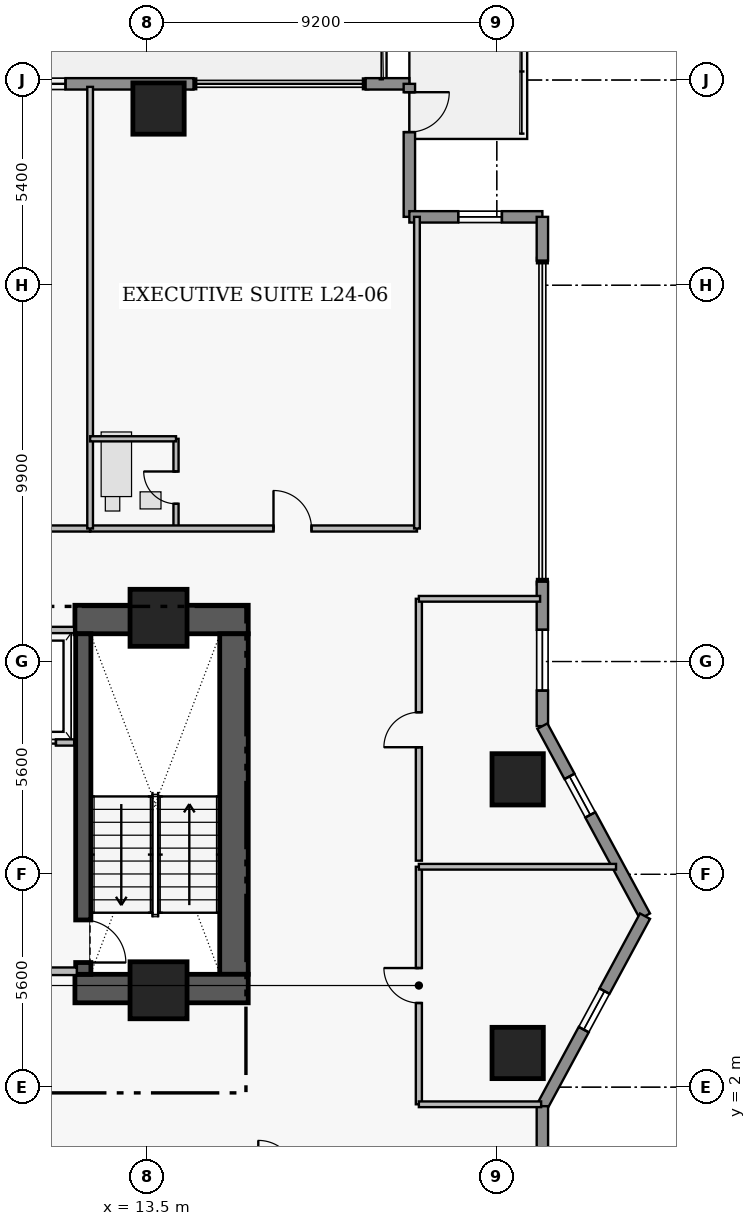
"""IFC4 building model, lengths in metres.
Left out: names, types, materials, properties, quantities, classifications, styles, units other than length and angle.
Written with IfcOpenShell. Run it as: python <this file> out.ifc"""

import sys

from ifc_helpers import new_model, si_unit, direction, frame, frame_2d, origin, origin_2d, place, context, subcontext, project, spatial, rectangle, extrude, element, fill, save


model = new_model("IFC4")
c1 = context("Model", 3, precision=1e-05, world=origin(), true_north=direction((0.0, 1.0)))
c2 = subcontext(c1, "Body", "Model", "MODEL_VIEW")
j1 = project(units=[si_unit("LENGTHUNIT", "METRE"), si_unit("PLANEANGLEUNIT", "RADIAN")], contexts=[c1])
p1 = place(None, origin())
s1 = spatial("IfcSite", under=j1, at=p1, CompositionType="ELEMENT")
p2 = place(p1, origin())
s2 = spatial("IfcBuilding", under=s1, at=p2, CompositionType="ELEMENT")
p3 = place(p2, frame((0.0, 0.0, 99.3)))
s3 = spatial("IfcBuildingStorey", under=s2, at=p3, CompositionType="ELEMENT", Elevation=99.3)
p4 = place(p3, frame((11.6, 14.305, 0.0), z_axis=(0.0, 0.0, 1.0), x_axis=(1.0, 0.0, 0.0)))
e1 = element("IfcWall", 1, at=p4, inside=s3, PredefinedType="SHEAR", context=c2, shape_type="SweptSolid", body=[
    extrude(rectangle(XDim=4.56, YDim=0.75, at=frame_2d((2.28, 0.0))), origin(), (0.0, 0.0, 1.0), 3.46),
])
p5 = place(p3, frame((15.785, 4.97, 0.0), z_axis=(0.0, 0.0, 1.0), x_axis=(0.0, 1.0, 0.0)))
e2 = element("IfcWall", 2, at=p5, inside=s3, PredefinedType="SHEAR", context=c2, shape_type="SweptSolid", body=[
    extrude(rectangle(XDim=8.96, YDim=0.75, at=frame_2d((4.48, 0.0))), origin(), (0.0, 0.0, 1.0), 3.46),
])
p6 = place(p3, frame((11.6, 4.595, 0.0), z_axis=(0.0, 0.0, 1.0), x_axis=(1.0, 0.0, 0.0)))
e3 = element("IfcWall", 3, at=p6, inside=s3, PredefinedType="SHEAR", context=c2, shape_type="SweptSolid", body=[
    extrude(rectangle(XDim=4.56, YDim=0.75, at=frame_2d((2.28, 0.0))), origin(), (0.0, 0.0, 1.0), 3.46),
])
p7 = place(p3, frame((11.82, 13.93, 0.0), z_axis=(0.0, 0.0, 1.0), x_axis=(0.0, -1.0, 0.0)))
e4 = element("IfcWall", 4, at=p7, inside=s3, PredefinedType="SHEAR", context=c2, shape_type="SweptSolid", body=[
    extrude(rectangle(XDim=8.96, YDim=0.4, at=frame_2d((4.48, 0.0))), origin(), (0.0, 0.0, 1.0), 3.46),
])
p8 = place(p7, frame((7.53, 0.0, 0.0)))
e5 = element("IfcOpeningElement", 5, at=p8, cuts=e4, PredefinedType="OPENING", context=c2, shape_type="SweptSolid", body=[
    extrude(rectangle(XDim=1.12, YDim=2.22, at=frame_2d((0.56, 1.11))), frame((0.0, 0.21, 0.0), z_axis=(0.0, -1.0, 0.0), x_axis=(1.0, 0.0, 0.0)), (0.0, 0.0, 1.0), 0.42),
])
for number, where, z_axis, x_axis in (
    (6, (13.8, 14.35, 0.0), (0.0, 0.0, 1.0), (1.0, 0.0, 0.0)),
    (7, (13.8, 4.55, 0.0), (0.0, 0.0, 1.0), (1.0, 0.0, 0.0)),
):
    element("IfcColumn", number, at=place(p3, frame(where, z_axis=z_axis, x_axis=x_axis)), inside=s3, PredefinedType="COLUMN", context=c2, shape_type="SweptSolid", body=[
        extrude(rectangle(XDim=1.5, YDim=1.5, at=origin_2d()), origin(), (0.0, 0.0, 1.0), 3.65),
    ])
for number, where, z_axis, x_axis in (
    (8, (13.8, 27.75, 0.0), (0.0, 0.0, 1.0), (1.0, 0.0, 0.0)),
    (9, (23.25, 2.9, 0.0), (0.0, 0.0, 1.0), (1.0, 0.0, 0.0)),
    (10, (23.25, 10.1, 0.0), (0.0, 0.0, 1.0), (1.0, 0.0, 0.0)),
):
    element("IfcColumn", number, at=place(p3, frame(where, z_axis=z_axis, x_axis=x_axis)), inside=s3, PredefinedType="COLUMN", context=c2, shape_type="SweptSolid", body=[
        extrude(rectangle(XDim=1.35, YDim=1.35, at=origin_2d()), origin(), (0.0, 0.0, 1.0), 3.65),
    ])
p9 = place(p3, frame((3.68, 28.4, 0.0), z_axis=(0.0, 0.0, 1.0), x_axis=(1.0, 0.0, 0.0)))
e11 = element("IfcWall", 11, at=p9, inside=s3, PredefinedType="STANDARD", context=c2, shape_type="SweptSolid", body=[
    extrude(rectangle(XDim=11.04, YDim=0.3, at=frame_2d((5.52, 0.0))), origin(), (0.0, 0.0, 1.0), 3.43),
])
p10 = place(p9, frame((4.695, 0.0, 0.0)))
e12 = element("IfcOpeningElement", 12, at=p10, cuts=e11, PredefinedType="OPENING", context=c2, shape_type="SweptSolid", body=[
    extrude(rectangle(XDim=1.05, YDim=2.2, at=frame_2d((0.525, 1.1))), frame((0.0, 0.16, 0.0), z_axis=(0.0, -1.0, 0.0), x_axis=(1.0, 0.0, 0.0)), (0.0, 0.0, 1.0), 0.32),
])
p11 = place(p9, frame((2.768, 0.0, 0.95)))
e13 = element("IfcOpeningElement", 13, at=p11, cuts=e11, PredefinedType="OPENING", context=c2, shape_type="SweptSolid", body=[
    extrude(rectangle(XDim=1.15, YDim=1.55, at=frame_2d((0.575, 0.775))), frame((0.0, 0.16, 0.0), z_axis=(0.0, -1.0, 0.0), x_axis=(1.0, 0.0, 0.0)), (0.0, 0.0, 1.0), 0.32),
])
p12 = place(p9, frame((6.522, 0.0, 0.95)))
e14 = element("IfcOpeningElement", 14, at=p12, cuts=e11, PredefinedType="OPENING", context=c2, shape_type="SweptSolid", body=[
    extrude(rectangle(XDim=1.15, YDim=1.55, at=frame_2d((0.575, 0.775))), frame((0.0, 0.16, 0.0), z_axis=(0.0, -1.0, 0.0), x_axis=(1.0, 0.0, 0.0)), (0.0, 0.0, 1.0), 0.32),
])
p13 = place(p3, frame((19.25, 28.4, 0.0), z_axis=(0.0, 0.0, 1.0), x_axis=(1.0, 0.0, 0.0)))
e15 = element("IfcWall", 15, at=p13, inside=s3, PredefinedType="STANDARD", context=c2, shape_type="SweptSolid", body=[
    extrude(rectangle(XDim=1.15, YDim=0.3, at=frame_2d((0.575, 0.0))), origin(), (0.0, 0.0, 1.0), 3.43),
])
p14 = place(p3, frame((20.4, 28.4, 0.0), z_axis=(0.0, 0.0, 1.0), x_axis=(0.0, -1.0, 0.0)))
e16 = element("IfcWall", 16, at=p14, inside=s3, PredefinedType="STANDARD", context=c2, shape_type="SweptSolid", body=[
    extrude(rectangle(XDim=3.5, YDim=0.3, at=frame_2d((1.75, 0.0))), origin(), (0.0, 0.0, 1.0), 3.43),
])
p15 = place(p14, frame((0.22, 0.0, 0.0)))
e17 = element("IfcOpeningElement", 17, at=p15, cuts=e16, PredefinedType="OPENING", context=c2, shape_type="SweptSolid", body=[
    extrude(rectangle(XDim=1.05, YDim=2.2, at=frame_2d((0.525, 1.1))), frame((0.0, 0.16, 0.0), z_axis=(0.0, -1.0, 0.0), x_axis=(1.0, 0.0, 0.0)), (0.0, 0.0, 1.0), 0.32),
])
p16 = place(p3, frame((20.4, 24.9, 0.0), z_axis=(0.0, 0.0, 1.0), x_axis=(1.0, 0.0, 0.0)))
e18 = element("IfcWall", 18, at=p16, inside=s3, PredefinedType="STANDARD", context=c2, shape_type="SweptSolid", body=[
    extrude(rectangle(XDim=3.5, YDim=0.3, at=frame_2d((1.75, 0.0))), origin(), (0.0, 0.0, 1.0), 3.43),
])
p17 = place(p16, frame((1.285, 0.0, 1.25)))
e19 = element("IfcOpeningElement", 19, at=p17, cuts=e18, PredefinedType="OPENING", context=c2, shape_type="SweptSolid", body=[
    extrude(rectangle(XDim=1.15, YDim=1.55, at=frame_2d((0.575, 0.775))), frame((0.0, 0.16, 0.0), z_axis=(0.0, -1.0, 0.0), x_axis=(1.0, 0.0, 0.0)), (0.0, 0.0, 1.0), 0.32),
])
p18 = place(p3, frame((23.9, 24.9, 0.0), z_axis=(0.0, 0.0, 1.0), x_axis=(0.0, -1.0, 0.0)))
e20 = element("IfcWall", 20, at=p18, inside=s3, PredefinedType="STANDARD", context=c2, shape_type="SweptSolid", body=[
    extrude(rectangle(XDim=1.15, YDim=0.3, at=frame_2d((0.575, 0.0))), origin(), (0.0, 0.0, 1.0), 3.43),
])
p19 = place(p3, frame((23.9, 15.3, 0.0), z_axis=(0.0, 0.0, 1.0), x_axis=(0.0, -1.0, 0.0)))
e21 = element("IfcWall", 21, at=p19, inside=s3, PredefinedType="STANDARD", context=c2, shape_type="SweptSolid", body=[
    extrude(rectangle(XDim=3.8, YDim=0.3, at=frame_2d((1.9, 0.0))), origin(), (0.0, 0.0, 1.0), 3.43),
])
p20 = place(p19, frame((1.265, 0.0, 0.85)))
e22 = element("IfcOpeningElement", 22, at=p20, cuts=e21, PredefinedType="OPENING", context=c2, shape_type="SweptSolid", body=[
    extrude(rectangle(XDim=1.6, YDim=1.8, at=frame_2d((0.8, 0.9))), frame((0.0, 0.16, 0.0), z_axis=(0.0, -1.0, 0.0), x_axis=(1.0, 0.0, 0.0)), (0.0, 0.0, 1.0), 0.32),
])
p21 = place(p3, frame((23.9, 11.5, 0.0), z_axis=(0.0, 0.0, 1.0), x_axis=(0.475175525499, -0.879891027325, 0.0)))
e23 = element("IfcWall", 23, at=p21, inside=s3, PredefinedType="STANDARD", context=c2, shape_type="SweptSolid", body=[
    extrude(rectangle(XDim=5.683, YDim=0.3, at=frame_2d((2.841, 0.0))), origin(), (0.0, 0.0, 1.0), 3.43),
])
p22 = place(p21, frame((1.503, 0.0, 1.25)))
e24 = element("IfcOpeningElement", 24, at=p22, cuts=e23, PredefinedType="OPENING", context=c2, shape_type="SweptSolid", body=[
    extrude(rectangle(XDim=1.15, YDim=1.55, at=frame_2d((0.575, 0.775))), frame((0.0, 0.16, 0.0), z_axis=(0.0, -1.0, 0.0), x_axis=(1.0, 0.0, 0.0)), (0.0, 0.0, 1.0), 0.32),
])
p23 = place(p3, frame((26.6, 6.5, 0.0), z_axis=(0.0, 0.0, 1.0), x_axis=(-0.475175525499, -0.879891027325, 0.0)))
e25 = element("IfcWall", 25, at=p23, inside=s3, PredefinedType="STANDARD", context=c2, shape_type="SweptSolid", body=[
    extrude(rectangle(XDim=5.683, YDim=0.3, at=frame_2d((2.841, 0.0))), origin(), (0.0, 0.0, 1.0), 3.43),
])
p24 = place(p23, frame((2.242, 0.0, 1.25)))
e26 = element("IfcOpeningElement", 26, at=p24, cuts=e25, PredefinedType="OPENING", context=c2, shape_type="SweptSolid", body=[
    extrude(rectangle(XDim=1.15, YDim=1.55, at=frame_2d((0.575, 0.775))), frame((0.0, 0.16, 0.0), z_axis=(0.0, -1.0, 0.0), x_axis=(1.0, 0.0, 0.0)), (0.0, 0.0, 1.0), 0.32),
])
p25 = place(p3, frame((23.9, 1.5, 0.0), z_axis=(0.0, 0.0, 1.0), x_axis=(0.0, -1.0, 0.0)))
e27 = element("IfcWall", 27, at=p25, inside=s3, PredefinedType="STANDARD", context=c2, shape_type="SweptSolid", body=[
    extrude(rectangle(XDim=1.15, YDim=0.3, at=frame_2d((0.575, 0.0))), origin(), (0.0, 0.0, 1.0), 3.43),
])
p26 = place(p3, frame((9.42, 11.07, 0.0), z_axis=(0.0, 0.0, 1.0), x_axis=(1.0, 0.0, 0.0)))
e28 = element("IfcWall", 28, at=p26, inside=s3, PredefinedType="PARTITIONING", context=c2, shape_type="SweptSolid", body=[
    extrude(rectangle(XDim=2.16, YDim=0.165, at=frame_2d((1.08, 0.0))), origin(), (0.0, 0.0, 1.0), 3.43),
])
p27 = place(p26, frame((0.53, 0.0, 0.0)))
e29 = element("IfcOpeningElement", 29, at=p27, cuts=e28, PredefinedType="OPENING", context=c2, shape_type="SweptSolid", body=[
    extrude(rectangle(XDim=1.15, YDim=2.25, at=frame_2d((0.575, 1.125))), frame((0.0, 0.093, 0.0), z_axis=(0.0, -1.0, 0.0), x_axis=(1.0, 0.0, 0.0)), (0.0, 0.0, 1.0), 0.185),
])
p28 = place(p3, frame((5.8, 16.7, 0.0), z_axis=(0.0, 0.0, 1.0), x_axis=(1.0, 0.0, 0.0)))
e30 = element("IfcWall", 30, at=p28, inside=s3, PredefinedType="PARTITIONING", context=c2, shape_type="SweptSolid", body=[
    extrude(rectangle(XDim=6.2, YDim=0.16, at=frame_2d((3.1, 0.0))), origin(), (0.0, 0.0, 1.0), 2.973),
])
p29 = place(p28, frame((3.75, 0.0, 0.0)))
e31 = element("IfcOpeningElement", 31, at=p29, cuts=e30, PredefinedType="OPENING", context=c2, shape_type="SweptSolid", body=[
    extrude(rectangle(XDim=1.0, YDim=2.15, at=frame_2d((0.5, 1.075))), frame((0.0, 0.09, 0.0), z_axis=(0.0, -1.0, 0.0), x_axis=(1.0, 0.0, 0.0)), (0.0, 0.0, 1.0), 0.18),
])
p30 = place(p3, frame((14.26, 16.7, 0.0), z_axis=(0.0, 0.0, 1.0), x_axis=(0.0, 1.0, 0.0)))
e32 = element("IfcWall", 32, at=p30, inside=s3, PredefinedType="PLUMBINGWALL", context=c2, shape_type="SweptSolid", body=[
    extrude(rectangle(XDim=2.36, YDim=0.135, at=frame_2d((1.18, 0.0))), origin(), (0.0, 0.0, 1.0), 2.503),
])
p31 = place(p30, frame((0.65, 0.0, 0.0)))
e33 = element("IfcOpeningElement", 33, at=p31, cuts=e32, PredefinedType="OPENING", context=c2, shape_type="SweptSolid", body=[
    extrude(rectangle(XDim=0.85, YDim=2.1, at=frame_2d((0.425, 1.05))), frame((0.0, 0.077, 0.0), z_axis=(0.0, -1.0, 0.0), x_axis=(1.0, 0.0, 0.0)), (0.0, 0.0, 1.0), 0.155),
])
p32 = place(p3, frame((12.0, 16.7, 0.0), z_axis=(0.0, 0.0, 1.0), x_axis=(1.0, 0.0, 0.0)))
e34 = element("IfcWall", 34, at=p32, inside=s3, PredefinedType="PARTITIONING", context=c2, shape_type="SweptSolid", body=[
    extrude(rectangle(XDim=8.6, YDim=0.16, at=frame_2d((4.3, 0.0))), origin(), (0.0, 0.0, 1.0), 2.973),
])
p33 = place(p32, frame((4.825, 0.0, 0.0)))
e35 = element("IfcOpeningElement", 35, at=p33, cuts=e34, PredefinedType="OPENING", context=c2, shape_type="SweptSolid", body=[
    extrude(rectangle(XDim=1.0, YDim=2.15, at=frame_2d((0.5, 1.075))), frame((0.0, 0.09, 0.0), z_axis=(0.0, -1.0, 0.0), x_axis=(1.0, 0.0, 0.0)), (0.0, 0.0, 1.0), 0.18),
])
p34 = place(p3, frame((20.65, 1.55, 0.0), z_axis=(0.0, 0.0, 1.0), x_axis=(0.0, 1.0, 0.0)))
e36 = element("IfcWall", 36, at=p34, inside=s3, PredefinedType="PARTITIONING", context=c2, shape_type="SweptSolid", body=[
    extrude(rectangle(XDim=6.25, YDim=0.16, at=frame_2d((3.125, 0.0))), origin(), (0.0, 0.0, 1.0), 3.43),
])
p35 = place(p34, frame((2.665, 0.0, 0.0)))
e37 = element("IfcOpeningElement", 37, at=p35, cuts=e36, PredefinedType="OPENING", context=c2, shape_type="SweptSolid", body=[
    extrude(rectangle(XDim=0.92, YDim=2.12, at=frame_2d((0.46, 1.06))), frame((0.0, 0.09, 0.0), z_axis=(0.0, -1.0, 0.0), x_axis=(1.0, 0.0, 0.0)), (0.0, 0.0, 1.0), 0.18),
])
p36 = place(p3, frame((20.65, 7.96, 0.0), z_axis=(0.0, 0.0, 1.0), x_axis=(0.0, 1.0, 0.0)))
e38 = element("IfcWall", 38, at=p36, inside=s3, PredefinedType="PARTITIONING", context=c2, shape_type="SweptSolid", body=[
    extrude(rectangle(XDim=6.89, YDim=0.16, at=frame_2d((3.445, 0.0))), origin(), (0.0, 0.0, 1.0), 3.43),
])
p37 = place(p36, frame((2.985, 0.0, 0.0)))
e39 = element("IfcOpeningElement", 39, at=p37, cuts=e38, PredefinedType="OPENING", context=c2, shape_type="SweptSolid", body=[
    extrude(rectangle(XDim=0.92, YDim=2.12, at=frame_2d((0.46, 1.06))), frame((0.0, 0.09, 0.0), z_axis=(0.0, -1.0, 0.0), x_axis=(1.0, 0.0, 0.0)), (0.0, 0.0, 1.0), 0.18),
])
p38 = place(p3, frame((8.8, 5.05, 0.0), z_axis=(0.0, 0.0, 1.0), x_axis=(1.0, 0.0, 0.0)))
e40 = element("IfcWall", 40, at=p38, inside=s3, PredefinedType="PARTITIONING", context=c2, shape_type="SweptSolid", body=[
    extrude(rectangle(XDim=2.85, YDim=0.2, at=frame_2d((1.425, 0.0))), origin(), (0.0, 0.0, 1.0), 3.43),
])
p39 = place(p3, frame((9.42, 14.03, 0.0), z_axis=(0.0, 0.0, 1.0), x_axis=(1.0, 0.0, 0.0)))
e41 = element("IfcWall", 41, at=p39, inside=s3, PredefinedType="PARTITIONING", context=c2, shape_type="SweptSolid", body=[
    extrude(rectangle(XDim=2.16, YDim=0.165, at=frame_2d((1.08, 0.0))), origin(), (0.0, 0.0, 1.0), 3.43),
])
p40 = place(p3, frame((12.0, 16.7, 0.0), z_axis=(0.0, 0.0, 1.0), x_axis=(0.0, 1.0, 0.0)))
e42 = element("IfcWall", 42, at=p40, inside=s3, PredefinedType="PARTITIONING", context=c2, shape_type="SweptSolid", body=[
    extrude(rectangle(XDim=11.62, YDim=0.15, at=frame_2d((5.81, 0.0))), origin(), (0.0, 0.0, 1.0), 3.43),
])
p41 = place(p3, frame((12.0, 19.06, 0.0), z_axis=(0.0, 0.0, 1.0), x_axis=(1.0, 0.0, 0.0)))
e43 = element("IfcWall", 43, at=p41, inside=s3, PredefinedType="PLUMBINGWALL", context=c2, shape_type="SweptSolid", body=[
    extrude(rectangle(XDim=2.26, YDim=0.135, at=frame_2d((1.13, 0.0))), origin(), (0.0, 0.0, 1.0), 2.973),
])
p42 = place(p3, frame((20.6, 16.7, 0.0), z_axis=(0.0, 0.0, 1.0), x_axis=(0.0, 1.0, 0.0)))
e44 = element("IfcWall", 44, at=p42, inside=s3, PredefinedType="PARTITIONING", context=c2, shape_type="SweptSolid", body=[
    extrude(rectangle(XDim=8.2, YDim=0.15, at=frame_2d((4.1, 0.0))), origin(), (0.0, 0.0, 1.0), 3.43),
])
p43 = place(p3, frame((20.65, 1.55, 0.0), z_axis=(0.0, 0.0, 1.0), x_axis=(1.0, 0.0, 0.0)))
e45 = element("IfcWall", 45, at=p43, inside=s3, PredefinedType="PARTITIONING", context=c2, shape_type="SweptSolid", body=[
    extrude(rectangle(XDim=3.217, YDim=0.15, at=frame_2d((1.608, 0.0))), origin(), (0.0, 0.0, 1.0), 3.43),
])
p44 = place(p3, frame((20.65, 7.8, 0.0), z_axis=(0.0, 0.0, 1.0), x_axis=(1.0, 0.0, 0.0)))
e46 = element("IfcWall", 46, at=p44, inside=s3, PredefinedType="PARTITIONING", context=c2, shape_type="SweptSolid", body=[
    extrude(rectangle(XDim=5.188, YDim=0.15, at=frame_2d((2.594, 0.0))), origin(), (0.0, 0.0, 1.0), 3.43),
])
p45 = place(p3, frame((20.65, 14.85, 0.0), z_axis=(0.0, 0.0, 1.0), x_axis=(1.0, 0.0, 0.0)))
e47 = element("IfcWall", 47, at=p45, inside=s3, PredefinedType="PARTITIONING", context=c2, shape_type="SweptSolid", body=[
    extrude(rectangle(XDim=3.19, YDim=0.15, at=frame_2d((1.595, 0.0))), origin(), (0.0, 0.0, 1.0), 3.43),
])
p46 = place(p12, origin())
e48 = element("IfcWindow", 48, at=p46, inside=s3, PartitioningType="SINGLE_PANEL", PredefinedType="WINDOW", context=c2, shape_type="SweptSolid", body=[
    extrude(rectangle(XDim=1.15, YDim=1.55, at=frame_2d((0.575, 0.775))), frame((0.0, 0.03, 0.0), z_axis=(0.0, -1.0, 0.0), x_axis=(1.0, 0.0, 0.0)), (0.0, 0.0, 1.0), 0.06),
])
fill(e14, e48)
p47 = place(p15, origin())
e49 = element("IfcDoor", 49, at=p47, inside=s3, OperationType="SINGLE_SWING_LEFT", PredefinedType="DOOR", context=c2, shape_type="SweptSolid", body=[
    extrude(rectangle(XDim=1.05, YDim=2.2, at=frame_2d((0.525, 1.1))), frame((0.0, 0.025, 0.0), z_axis=(0.0, -1.0, 0.0), x_axis=(1.0, 0.0, 0.0)), (0.0, 0.0, 1.0), 0.05),
])
fill(e17, e49)
p48 = place(p17, origin())
e50 = element("IfcWindow", 50, at=p48, inside=s3, PartitioningType="SINGLE_PANEL", PredefinedType="WINDOW", context=c2, shape_type="SweptSolid", body=[
    extrude(rectangle(XDim=1.15, YDim=1.55, at=frame_2d((0.575, 0.775))), frame((0.0, 0.03, 0.0), z_axis=(0.0, -1.0, 0.0), x_axis=(1.0, 0.0, 0.0)), (0.0, 0.0, 1.0), 0.06),
])
fill(e19, e50)
p49 = place(p20, origin())
e51 = element("IfcWindow", 51, at=p49, inside=s3, PartitioningType="SINGLE_PANEL", PredefinedType="WINDOW", context=c2, shape_type="SweptSolid", body=[
    extrude(rectangle(XDim=1.6, YDim=1.8, at=frame_2d((0.8, 0.9))), frame((0.0, 0.03, 0.0), z_axis=(0.0, -1.0, 0.0), x_axis=(1.0, 0.0, 0.0)), (0.0, 0.0, 1.0), 0.06),
])
fill(e22, e51)
p50 = place(p22, origin())
e52 = element("IfcWindow", 52, at=p50, inside=s3, PartitioningType="SINGLE_PANEL", PredefinedType="WINDOW", context=c2, shape_type="SweptSolid", body=[
    extrude(rectangle(XDim=1.15, YDim=1.55, at=frame_2d((0.575, 0.775))), frame((0.0, 0.03, 0.0), z_axis=(0.0, -1.0, 0.0), x_axis=(1.0, 0.0, 0.0)), (0.0, 0.0, 1.0), 0.06),
])
fill(e24, e52)
p51 = place(p24, origin())
e53 = element("IfcWindow", 53, at=p51, inside=s3, PartitioningType="SINGLE_PANEL", PredefinedType="WINDOW", context=c2, shape_type="SweptSolid", body=[
    extrude(rectangle(XDim=1.15, YDim=1.55, at=frame_2d((0.575, 0.775))), frame((0.0, 0.03, 0.0), z_axis=(0.0, -1.0, 0.0), x_axis=(1.0, 0.0, 0.0)), (0.0, 0.0, 1.0), 0.06),
])
fill(e26, e53)
p52 = place(p8, origin())
e54 = element("IfcDoor", 54, at=p52, inside=s3, OperationType="SINGLE_SWING_RIGHT", PredefinedType="DOOR", context=c2, shape_type="SweptSolid", body=[
    extrude(rectangle(XDim=1.12, YDim=2.22, at=frame_2d((0.56, 1.11))), frame((0.0, 0.025, 0.0), z_axis=(0.0, -1.0, 0.0), x_axis=(1.0, 0.0, 0.0)), (0.0, 0.0, 1.0), 0.05),
])
fill(e5, e54)
p53 = place(p27, origin())
e55 = element("IfcDoor", 55, at=p53, inside=s3, OperationType="SLIDING_TO_LEFT", PredefinedType="DOOR", context=c2, shape_type="SweptSolid", body=[
    extrude(rectangle(XDim=1.15, YDim=2.25, at=frame_2d((0.575, 1.125))), frame((0.0, 0.025, 0.0), z_axis=(0.0, -1.0, 0.0), x_axis=(1.0, 0.0, 0.0)), (0.0, 0.0, 1.0), 0.05),
])
fill(e29, e55)
p54 = place(p31, origin())
e56 = element("IfcDoor", 56, at=p54, inside=s3, OperationType="SINGLE_SWING_RIGHT", PredefinedType="DOOR", context=c2, shape_type="SweptSolid", body=[
    extrude(rectangle(XDim=0.85, YDim=2.1, at=frame_2d((0.425, 1.05))), frame((0.0, 0.025, 0.0), z_axis=(0.0, -1.0, 0.0), x_axis=(1.0, 0.0, 0.0)), (0.0, 0.0, 1.0), 0.05),
])
fill(e33, e56)
p55 = place(p33, origin())
e57 = element("IfcDoor", 57, at=p55, inside=s3, OperationType="SINGLE_SWING_LEFT", PredefinedType="DOOR", context=c2, shape_type="SweptSolid", body=[
    extrude(rectangle(XDim=1.0, YDim=2.15, at=frame_2d((0.5, 1.075))), frame((0.0, 0.025, 0.0), z_axis=(0.0, -1.0, 0.0), x_axis=(1.0, 0.0, 0.0)), (0.0, 0.0, 1.0), 0.05),
])
fill(e35, e57)
p56 = place(p35, origin())
e58 = element("IfcDoor", 58, at=p56, inside=s3, OperationType="SINGLE_SWING_RIGHT", PredefinedType="DOOR", context=c2, shape_type="SweptSolid", body=[
    extrude(rectangle(XDim=0.92, YDim=2.12, at=frame_2d((0.46, 1.06))), frame((0.0, 0.025, 0.0), z_axis=(0.0, -1.0, 0.0), x_axis=(1.0, 0.0, 0.0)), (0.0, 0.0, 1.0), 0.05),
])
fill(e37, e58)
p57 = place(p37, origin())
e59 = element("IfcDoor", 59, at=p57, inside=s3, OperationType="SINGLE_SWING_LEFT", PredefinedType="DOOR", context=c2, shape_type="SweptSolid", body=[
    extrude(rectangle(XDim=0.92, YDim=2.12, at=frame_2d((0.46, 1.06))), frame((0.0, 0.025, 0.0), z_axis=(0.0, -1.0, 0.0), x_axis=(1.0, 0.0, 0.0)), (0.0, 0.0, 1.0), 0.05),
])
fill(e39, e59)
save(model, sys.argv[1])
